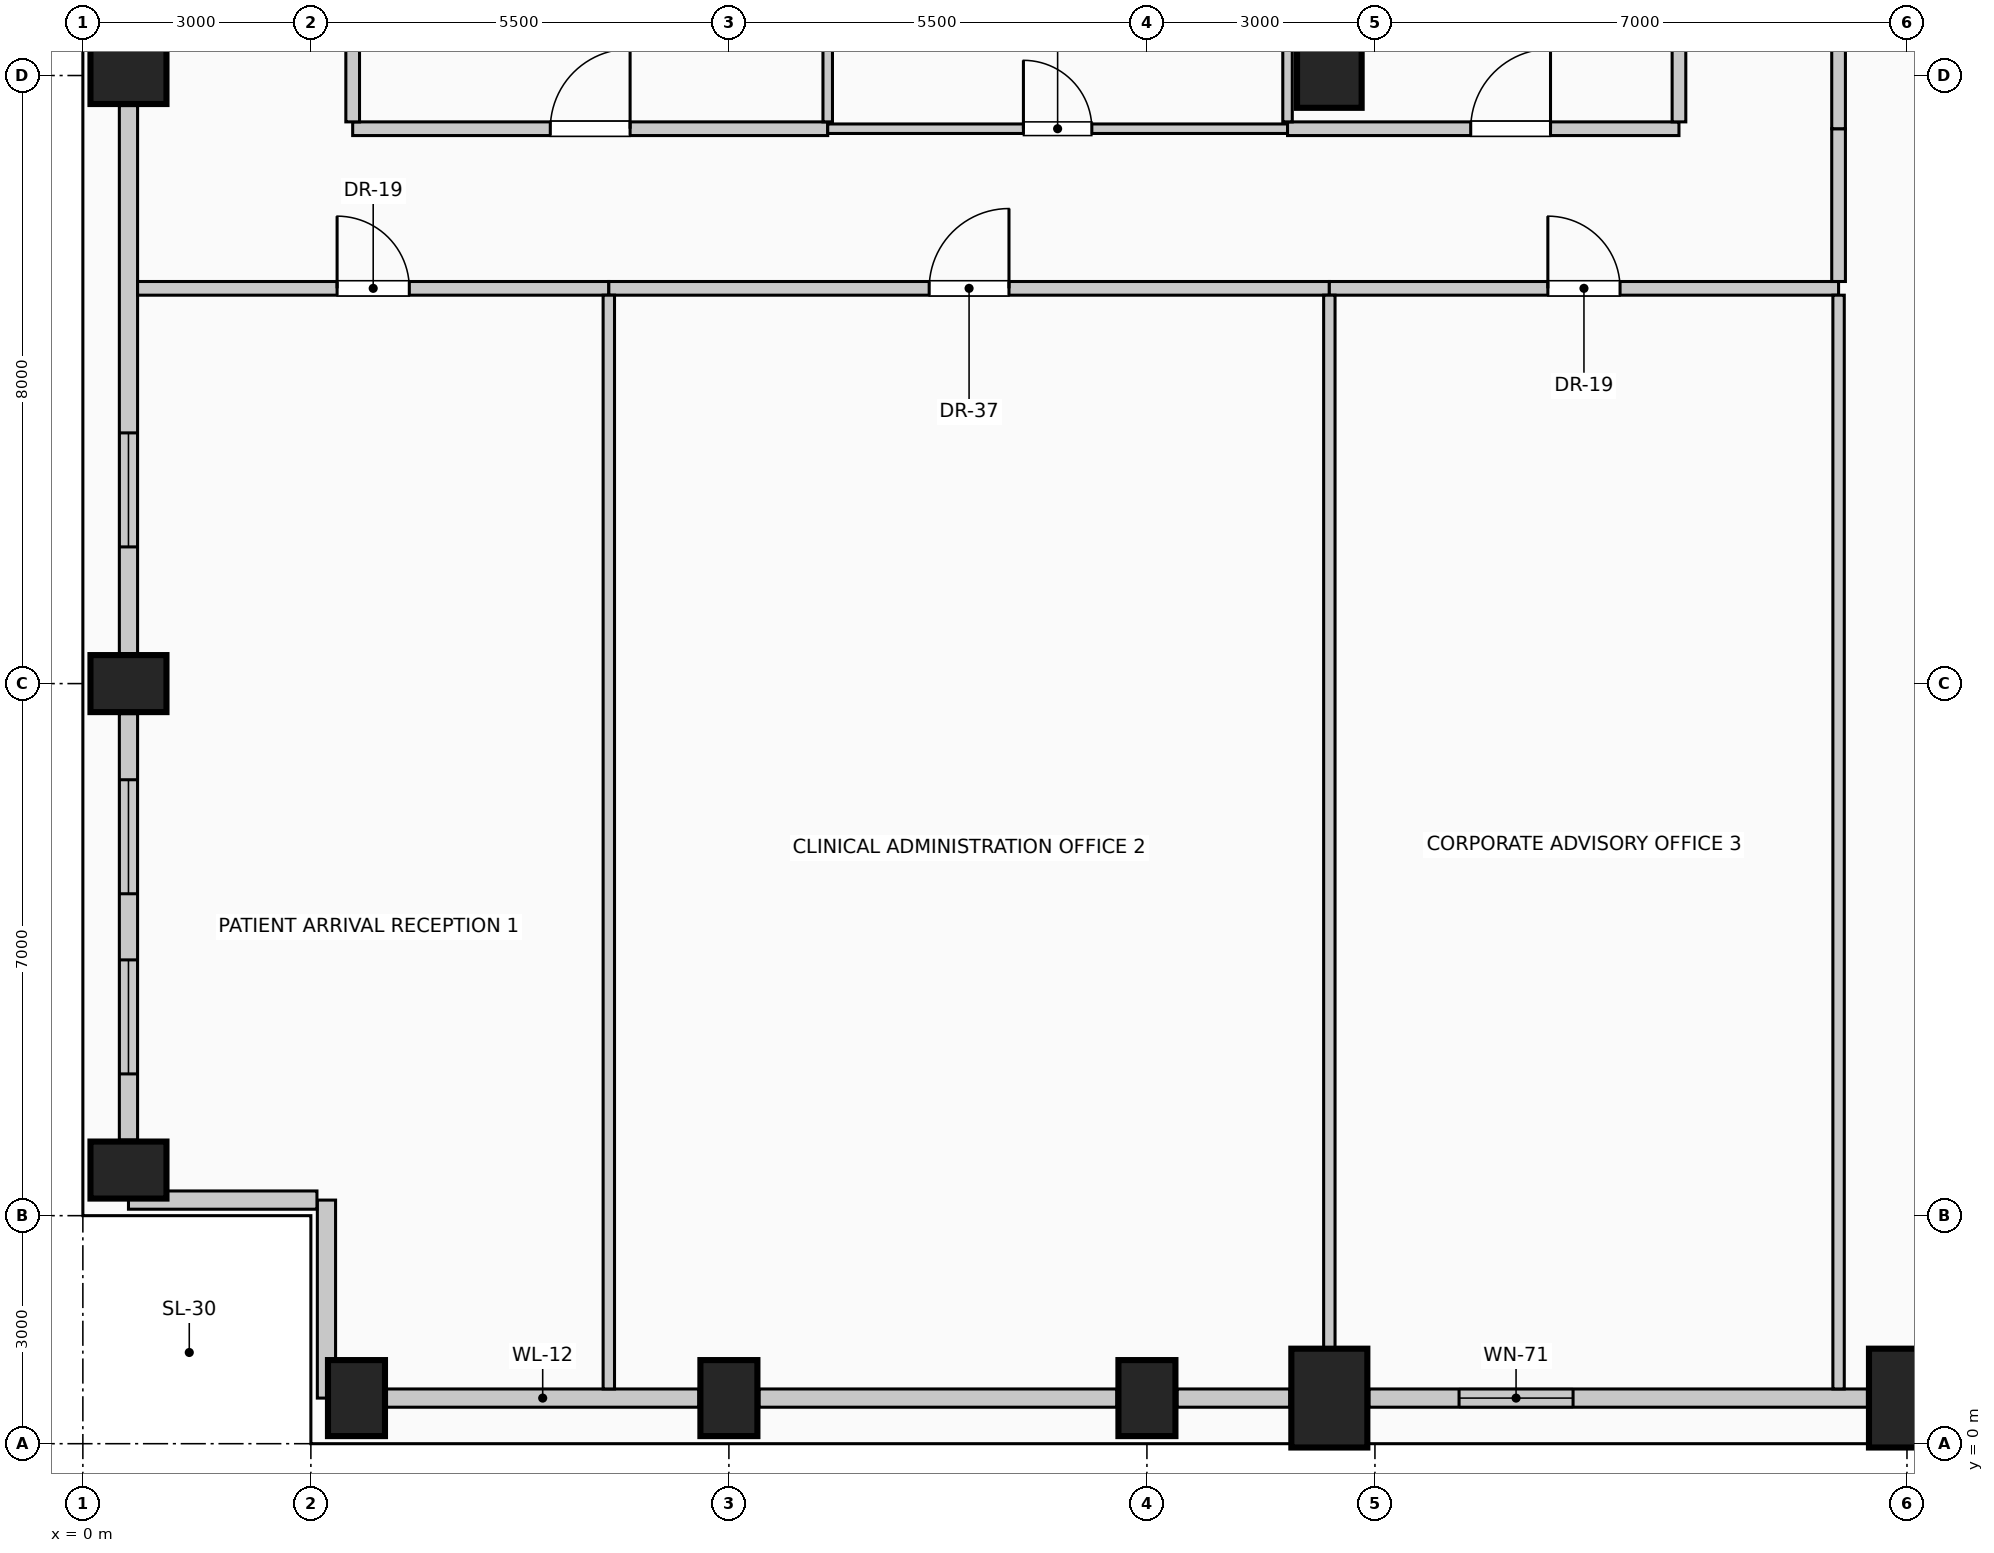
"""IFC4 building model, lengths in metres.
Left out: names, types, materials, properties, quantities, classifications, styles, units other than length and angle.
Written with IfcOpenShell. Run it as: python <this file> out.ifc"""

import sys

from ifc_helpers import new_model, si_unit, direction, frame, frame_2d, origin, origin_2d, place, context, subcontext, project, spatial, rectangle, circle, extrude, element, fill, save


model = new_model("IFC4")
c1 = context("Model", 3, precision=1e-05, world=origin(), true_north=direction((0.0, 1.0)))
c2 = subcontext(c1, "Body", "Model", "MODEL_VIEW")
j1 = project(units=[si_unit("LENGTHUNIT", "METRE"), si_unit("PLANEANGLEUNIT", "RADIAN")], contexts=[c1])
p1 = place(None, origin())
s1 = spatial("IfcSite", under=j1, at=p1, CompositionType="ELEMENT")
p2 = place(p1, origin())
s2 = spatial("IfcBuilding", under=s1, at=p2, CompositionType="ELEMENT")
p3 = place(p2, frame((0.0, 0.0, 260.6)))
s3 = spatial("IfcBuildingStorey", under=s2, at=p3, CompositionType="ELEMENT", Elevation=260.6)
for number, where, z_axis, x_axis in (
    (1, (3.6, 0.6, 0.0), (0.0, 0.0, 1.0), (1.0, 0.0, 0.0)),
    (2, (8.5, 0.6, 0.0), (0.0, 0.0, 1.0), (1.0, 0.0, 0.0)),
    (3, (14.0, 0.6, 0.0), (0.0, 0.0, 1.0), (1.0, 0.0, 0.0)),
):
    element("IfcColumn", number, at=place(p3, frame(where, z_axis=z_axis, x_axis=x_axis)), inside=s3, PredefinedType="COLUMN", context=c2, shape_type="SweptSolid", body=[
        extrude(rectangle(XDim=0.75, YDim=1.0, at=origin_2d()), origin(), (0.0, 0.0, 1.0), 4.0),
    ])
for number, where, z_axis, x_axis in (
    (4, (16.4, 0.6, 0.0), (0.0, 0.0, 1.0), (1.0, 0.0, 0.0)),
    (5, (24.0, 0.6, 0.0), (0.0, 0.0, 1.0), (1.0, 0.0, 0.0)),
):
    element("IfcColumn", number, at=place(p3, frame(where, z_axis=z_axis, x_axis=x_axis)), inside=s3, PredefinedType="COLUMN", context=c2, shape_type="SweptSolid", body=[
        extrude(rectangle(XDim=1.0, YDim=1.3, at=origin_2d()), origin(), (0.0, 0.0, 1.0), 4.0),
    ])
for number, where, z_axis, x_axis in (
    (6, (0.6, 3.6, 0.0), (0.0, 0.0, 1.0), (0.0, 1.0, 0.0)),
    (7, (0.6, 10.0, 0.0), (0.0, 0.0, 1.0), (0.0, 1.0, 0.0)),
    (8, (0.6, 18.0, 0.0), (0.0, 0.0, 1.0), (0.0, 1.0, 0.0)),
):
    element("IfcColumn", number, at=place(p3, frame(where, z_axis=z_axis, x_axis=x_axis)), inside=s3, PredefinedType="COLUMN", context=c2, shape_type="SweptSolid", body=[
        extrude(rectangle(XDim=0.75, YDim=1.0, at=origin_2d()), origin(), (0.0, 0.0, 1.0), 4.0),
    ])
p4 = place(p3, frame((16.4, 18.0, 0.0), z_axis=(0.0, 0.0, 1.0), x_axis=(1.0, 0.0, 0.0)))
e9 = element("IfcColumn", 9, at=p4, inside=s3, PredefinedType="COLUMN", context=c2, shape_type="SweptSolid", body=[
    extrude(circle(Radius=0.425, at=origin_2d()), origin(), (0.0, 0.0, 1.0), 4.0),
])
p5 = place(p3, frame((8.105, 0.6, 0.0), z_axis=(0.0, 0.0, 1.0), x_axis=(-1.0, 0.0, 0.0)))
e10 = element("IfcWall", 10, at=p5, inside=s3, PredefinedType="SOLIDWALL", context=c2, shape_type="SweptSolid", body=[
    extrude(rectangle(XDim=4.11, YDim=0.24, at=frame_2d((2.055, 0.0))), origin(), (0.0, 0.0, 1.0), 3.0),
])
p6 = place(p3, frame((13.605, 0.6, 0.0), z_axis=(0.0, 0.0, 1.0), x_axis=(-1.0, 0.0, 0.0)))
e11 = element("IfcWall", 11, at=p6, inside=s3, PredefinedType="SOLIDWALL", context=c2, shape_type="SweptSolid", body=[
    extrude(rectangle(XDim=4.71, YDim=0.24, at=frame_2d((2.355, 0.0))), origin(), (0.0, 0.0, 1.0), 3.0),
])
p7 = place(p3, frame((15.88, 0.6, 0.0), z_axis=(0.0, 0.0, 1.0), x_axis=(-1.0, 0.0, 0.0)))
e12 = element("IfcWall", 12, at=p7, inside=s3, PredefinedType="SOLIDWALL", context=c2, shape_type="SweptSolid", body=[
    extrude(rectangle(XDim=1.485, YDim=0.24, at=frame_2d((0.742, 0.0))), origin(), (0.0, 0.0, 1.0), 3.0),
])
p8 = place(p3, frame((23.48, 0.6, 0.0), z_axis=(0.0, 0.0, 1.0), x_axis=(-1.0, 0.0, 0.0)))
e13 = element("IfcWall", 13, at=p8, inside=s3, PredefinedType="SOLIDWALL", context=c2, shape_type="SweptSolid", body=[
    extrude(rectangle(XDim=6.56, YDim=0.24, at=frame_2d((3.28, 0.0))), origin(), (0.0, 0.0, 1.0), 3.0),
])
p9 = place(p8, frame((3.873, 0.0, 0.42)))
e14 = element("IfcOpeningElement", 14, at=p9, cuts=e13, PredefinedType="OPENING", context=c2, shape_type="SweptSolid", body=[
    extrude(rectangle(XDim=1.5, YDim=2.2, at=frame_2d((0.75, 1.1))), frame((0.0, 0.13, 0.0), z_axis=(0.0, -1.0, 0.0), x_axis=(1.0, 0.0, 0.0)), (0.0, 0.0, 1.0), 0.26),
])
p10 = place(p3, frame((0.6, 3.995, 0.0), z_axis=(0.0, 0.0, 1.0), x_axis=(0.0, 1.0, 0.0)))
e15 = element("IfcWall", 15, at=p10, inside=s3, PredefinedType="SOLIDWALL", context=c2, shape_type="SweptSolid", body=[
    extrude(rectangle(XDim=5.61, YDim=0.24, at=frame_2d((2.805, 0.0))), origin(), (0.0, 0.0, 1.0), 3.0),
])
p11 = place(p10, frame((0.87, 0.0, 0.42)))
e16 = element("IfcOpeningElement", 16, at=p11, cuts=e15, PredefinedType="OPENING", context=c2, shape_type="SweptSolid", body=[
    extrude(rectangle(XDim=1.5, YDim=2.2, at=frame_2d((0.75, 1.1))), frame((0.0, 0.13, 0.0), z_axis=(0.0, -1.0, 0.0), x_axis=(1.0, 0.0, 0.0)), (0.0, 0.0, 1.0), 0.26),
])
p12 = place(p10, frame((3.24, 0.0, 0.42)))
e17 = element("IfcOpeningElement", 17, at=p12, cuts=e15, PredefinedType="OPENING", context=c2, shape_type="SweptSolid", body=[
    extrude(rectangle(XDim=1.5, YDim=2.2, at=frame_2d((0.75, 1.1))), frame((0.0, 0.13, 0.0), z_axis=(0.0, -1.0, 0.0), x_axis=(1.0, 0.0, 0.0)), (0.0, 0.0, 1.0), 0.26),
])
p13 = place(p3, frame((0.6, 10.395, 0.0), z_axis=(0.0, 0.0, 1.0), x_axis=(0.0, 1.0, 0.0)))
e18 = element("IfcWall", 18, at=p13, inside=s3, PredefinedType="SOLIDWALL", context=c2, shape_type="SweptSolid", body=[
    extrude(rectangle(XDim=7.21, YDim=0.24, at=frame_2d((3.605, 0.0))), origin(), (0.0, 0.0, 1.0), 3.0),
])
p14 = place(p13, frame((1.403, 0.0, 0.42)))
e19 = element("IfcOpeningElement", 19, at=p14, cuts=e18, PredefinedType="OPENING", context=c2, shape_type="SweptSolid", body=[
    extrude(rectangle(XDim=1.5, YDim=2.2, at=frame_2d((0.75, 1.1))), frame((0.0, 0.13, 0.0), z_axis=(0.0, -1.0, 0.0), x_axis=(1.0, 0.0, 0.0)), (0.0, 0.0, 1.0), 0.26),
])
p15 = place(p3, frame((3.205, 0.6, 0.0), z_axis=(0.0, 0.0, 1.0), x_axis=(0.0, 1.0, 0.0)))
e20 = element("IfcWall", 20, at=p15, inside=s3, PredefinedType="SOLIDWALL", context=c2, shape_type="SweptSolid", body=[
    extrude(rectangle(XDim=2.605, YDim=0.24, at=frame_2d((1.302, 0.0))), origin(), (0.0, 0.0, 1.0), 3.75),
])
p16 = place(p3, frame((3.08, 3.205, 0.0), z_axis=(0.0, 0.0, 1.0), x_axis=(-1.0, 0.0, 0.0)))
e21 = element("IfcWall", 21, at=p16, inside=s3, PredefinedType="SOLIDWALL", context=c2, shape_type="SweptSolid", body=[
    extrude(rectangle(XDim=2.48, YDim=0.24, at=frame_2d((1.24, 0.0))), origin(), (0.0, 0.0, 1.0), 3.75),
])
p17 = place(p3, frame((0.72, 15.2, 0.0), z_axis=(0.0, 0.0, 1.0), x_axis=(1.0, 0.0, 0.0)))
e22 = element("IfcWall", 22, at=p17, inside=s3, PredefinedType="PARTITIONING", context=c2, shape_type="SweptSolid", body=[
    extrude(rectangle(XDim=6.2, YDim=0.18, at=frame_2d((3.1, 0.0))), origin(), (0.0, 0.0, 1.0), 3.75),
])
p18 = place(p17, frame((2.625, 0.0, 0.0)))
e23 = element("IfcOpeningElement", 23, at=p18, cuts=e22, PredefinedType="OPENING", context=c2, shape_type="SweptSolid", body=[
    extrude(rectangle(XDim=0.95, YDim=2.15, at=frame_2d((0.475, 1.075))), frame((0.0, 0.1, 0.0), z_axis=(0.0, -1.0, 0.0), x_axis=(1.0, 0.0, 0.0)), (0.0, 0.0, 1.0), 0.2),
])
p19 = place(p3, frame((6.92, 15.2, 0.0), z_axis=(0.0, 0.0, 1.0), x_axis=(1.0, 0.0, 0.0)))
e24 = element("IfcWall", 24, at=p19, inside=s3, PredefinedType="PARTITIONING", context=c2, shape_type="SweptSolid", body=[
    extrude(rectangle(XDim=9.48, YDim=0.18, at=frame_2d((4.74, 0.0))), origin(), (0.0, 0.0, 1.0), 3.75),
])
p20 = place(p19, frame((4.215, 0.0, 0.0)))
e25 = element("IfcOpeningElement", 25, at=p20, cuts=e24, PredefinedType="OPENING", context=c2, shape_type="SweptSolid", body=[
    extrude(rectangle(XDim=1.05, YDim=2.15, at=frame_2d((0.525, 1.075))), frame((0.0, 0.1, 0.0), z_axis=(0.0, -1.0, 0.0), x_axis=(1.0, 0.0, 0.0)), (0.0, 0.0, 1.0), 0.2),
])
p21 = place(p3, frame((16.4, 15.2, 0.0), z_axis=(0.0, 0.0, 1.0), x_axis=(1.0, 0.0, 0.0)))
e26 = element("IfcWall", 26, at=p21, inside=s3, PredefinedType="PARTITIONING", context=c2, shape_type="SweptSolid", body=[
    extrude(rectangle(XDim=6.7, YDim=0.18, at=frame_2d((3.35, 0.0))), origin(), (0.0, 0.0, 1.0), 3.75),
])
p22 = place(p21, frame((2.875, 0.0, 0.0)))
e27 = element("IfcOpeningElement", 27, at=p22, cuts=e26, PredefinedType="OPENING", context=c2, shape_type="SweptSolid", body=[
    extrude(rectangle(XDim=0.95, YDim=2.15, at=frame_2d((0.475, 1.075))), frame((0.0, 0.1, 0.0), z_axis=(0.0, -1.0, 0.0), x_axis=(1.0, 0.0, 0.0)), (0.0, 0.0, 1.0), 0.2),
])
p23 = place(p3, frame((3.55, 17.3, 0.0), z_axis=(0.0, 0.0, 1.0), x_axis=(1.0, 0.0, 0.0)))
e28 = element("IfcWall", 28, at=p23, inside=s3, PredefinedType="PARTITIONING", context=c2, shape_type="SweptSolid", body=[
    extrude(rectangle(XDim=6.25, YDim=0.18, at=frame_2d((3.125, 0.0))), origin(), (0.0, 0.0, 1.0), 3.75),
])
p24 = place(p23, frame((2.6, 0.0, 0.0)))
e29 = element("IfcOpeningElement", 29, at=p24, cuts=e28, PredefinedType="OPENING", context=c2, shape_type="SweptSolid", body=[
    extrude(rectangle(XDim=1.05, YDim=2.15, at=frame_2d((0.525, 1.075))), frame((0.0, 0.1, 0.0), z_axis=(0.0, -1.0, 0.0), x_axis=(1.0, 0.0, 0.0)), (0.0, 0.0, 1.0), 0.2),
])
p25 = place(p3, frame((9.8, 17.3, 0.0), z_axis=(0.0, 0.0, 1.0), x_axis=(1.0, 0.0, 0.0)))
e30 = element("IfcWall", 30, at=p25, inside=s3, PredefinedType="PARTITIONING", context=c2, shape_type="SweptSolid", body=[
    extrude(rectangle(XDim=6.05, YDim=0.125, at=frame_2d((3.025, 0.0))), origin(), (0.0, 0.0, 1.0), 3.75),
])
p26 = place(p25, frame((2.575, 0.0, 0.0)))
e31 = element("IfcOpeningElement", 31, at=p26, cuts=e30, PredefinedType="OPENING", context=c2, shape_type="SweptSolid", body=[
    extrude(rectangle(XDim=0.9, YDim=2.1, at=frame_2d((0.45, 1.05))), frame((0.0, 0.073, 0.0), z_axis=(0.0, -1.0, 0.0), x_axis=(1.0, 0.0, 0.0)), (0.0, 0.0, 1.0), 0.145),
])
p27 = place(p3, frame((15.85, 17.3, 0.0), z_axis=(0.0, 0.0, 1.0), x_axis=(1.0, 0.0, 0.0)))
e32 = element("IfcWall", 32, at=p27, inside=s3, PredefinedType="PARTITIONING", context=c2, shape_type="SweptSolid", body=[
    extrude(rectangle(XDim=5.15, YDim=0.18, at=frame_2d((2.575, 0.0))), origin(), (0.0, 0.0, 1.0), 3.75),
])
p28 = place(p27, frame((2.41, 0.0, 0.0)))
e33 = element("IfcOpeningElement", 33, at=p28, cuts=e32, PredefinedType="OPENING", context=c2, shape_type="SweptSolid", body=[
    extrude(rectangle(XDim=1.05, YDim=2.15, at=frame_2d((0.525, 1.075))), frame((0.0, 0.1, 0.0), z_axis=(0.0, -1.0, 0.0), x_axis=(1.0, 0.0, 0.0)), (0.0, 0.0, 1.0), 0.2),
])
p29 = place(p3, frame((3.55, 17.39, 0.0), z_axis=(0.0, 0.0, 1.0), x_axis=(0.0, 1.0, 0.0)))
e34 = element("IfcWall", 34, at=p29, inside=s3, PredefinedType="PARTITIONING", context=c2, shape_type="SweptSolid", body=[
    extrude(rectangle(XDim=7.335, YDim=0.18, at=frame_2d((3.667, 0.0))), origin(), (0.0, 0.0, 1.0), 3.75),
])
p30 = place(p3, frame((6.92, 0.72, 0.0), z_axis=(0.0, 0.0, 1.0), x_axis=(0.0, 1.0, 0.0)))
e35 = element("IfcWall", 35, at=p30, inside=s3, PredefinedType="PARTITIONING", context=c2, shape_type="SweptSolid", body=[
    extrude(rectangle(XDim=14.39, YDim=0.15, at=frame_2d((7.195, 0.0))), origin(), (0.0, 0.0, 1.0), 3.75),
])
for number, where, z_axis, x_axis in (
    (36, (9.8, 17.39, 0.0), (0.0, 0.0, 1.0), (0.0, 1.0, 0.0)),
    (37, (15.85, 17.39, 0.0), (0.0, 0.0, 1.0), (0.0, 1.0, 0.0)),
):
    element("IfcWall", number, at=place(p3, frame(where, z_axis=z_axis, x_axis=x_axis)), inside=s3, PredefinedType="PARTITIONING", context=c2, shape_type="SweptSolid", body=[
        extrude(rectangle(XDim=7.335, YDim=0.125, at=frame_2d((3.667, 0.0))), origin(), (0.0, 0.0, 1.0), 3.75),
    ])
p31 = place(p3, frame((16.4, 1.25, 0.0), z_axis=(0.0, 0.0, 1.0), x_axis=(0.0, 1.0, 0.0)))
e38 = element("IfcWall", 38, at=p31, inside=s3, PredefinedType="PARTITIONING", context=c2, shape_type="SweptSolid", body=[
    extrude(rectangle(XDim=13.86, YDim=0.15, at=frame_2d((6.93, 0.0))), origin(), (0.0, 0.0, 1.0), 3.195),
])
p32 = place(p3, frame((21.0, 17.39, 0.0), z_axis=(0.0, 0.0, 1.0), x_axis=(0.0, 1.0, 0.0)))
e39 = element("IfcWall", 39, at=p32, inside=s3, PredefinedType="PARTITIONING", context=c2, shape_type="SweptSolid", body=[
    extrude(rectangle(XDim=7.335, YDim=0.18, at=frame_2d((3.667, 0.0))), origin(), (0.0, 0.0, 1.0), 3.75),
])
p33 = place(p3, frame((23.1, 0.72, 0.0), z_axis=(0.0, 0.0, 1.0), x_axis=(0.0, 1.0, 0.0)))
e40 = element("IfcWall", 40, at=p33, inside=s3, PredefinedType="PARTITIONING", context=c2, shape_type="SweptSolid", body=[
    extrude(rectangle(XDim=14.39, YDim=0.15, at=frame_2d((7.195, 0.0))), origin(), (0.0, 0.0, 1.0), 3.75),
])
p34 = place(p3, frame((23.1, 15.29, 0.0), z_axis=(0.0, 0.0, 1.0), x_axis=(0.0, 1.0, 0.0)))
e41 = element("IfcWall", 41, at=p34, inside=s3, PredefinedType="PARTITIONING", context=c2, shape_type="SweptSolid", body=[
    extrude(rectangle(XDim=2.01, YDim=0.18, at=frame_2d((1.005, 0.0))), origin(), (0.0, 0.0, 1.0), 3.75),
])
p35 = place(p3, frame((23.1, 17.3, 0.0), z_axis=(0.0, 0.0, 1.0), x_axis=(0.0, 1.0, 0.0)))
e42 = element("IfcWall", 42, at=p35, inside=s3, PredefinedType="PARTITIONING", context=c2, shape_type="SweptSolid", body=[
    extrude(rectangle(XDim=9.51, YDim=0.18, at=frame_2d((4.755, 0.0))), origin(), (0.0, 0.0, 1.0), 3.75),
])
p36 = place(p9, origin())
e43 = element("IfcWindow", 43, at=p36, inside=s3, PartitioningType="SINGLE_PANEL", PredefinedType="WINDOW", context=c2, shape_type="SweptSolid", body=[
    extrude(rectangle(XDim=1.5, YDim=2.2, at=frame_2d((0.75, 1.1))), frame((0.0, 0.03, 0.0), z_axis=(0.0, -1.0, 0.0), x_axis=(1.0, 0.0, 0.0)), (0.0, 0.0, 1.0), 0.06),
])
fill(e14, e43)
p37 = place(p11, origin())
e44 = element("IfcWindow", 44, at=p37, inside=s3, PartitioningType="SINGLE_PANEL", PredefinedType="WINDOW", context=c2, shape_type="SweptSolid", body=[
    extrude(rectangle(XDim=1.5, YDim=2.2, at=frame_2d((0.75, 1.1))), frame((0.0, 0.03, 0.0), z_axis=(0.0, -1.0, 0.0), x_axis=(1.0, 0.0, 0.0)), (0.0, 0.0, 1.0), 0.06),
])
fill(e16, e44)
p38 = place(p12, origin())
e45 = element("IfcWindow", 45, at=p38, inside=s3, PartitioningType="SINGLE_PANEL", PredefinedType="WINDOW", context=c2, shape_type="SweptSolid", body=[
    extrude(rectangle(XDim=1.5, YDim=2.2, at=frame_2d((0.75, 1.1))), frame((0.0, 0.03, 0.0), z_axis=(0.0, -1.0, 0.0), x_axis=(1.0, 0.0, 0.0)), (0.0, 0.0, 1.0), 0.06),
])
fill(e17, e45)
p39 = place(p14, origin())
e46 = element("IfcWindow", 46, at=p39, inside=s3, PartitioningType="SINGLE_PANEL", PredefinedType="WINDOW", context=c2, shape_type="SweptSolid", body=[
    extrude(rectangle(XDim=1.5, YDim=2.2, at=frame_2d((0.75, 1.1))), frame((0.0, 0.03, 0.0), z_axis=(0.0, -1.0, 0.0), x_axis=(1.0, 0.0, 0.0)), (0.0, 0.0, 1.0), 0.06),
])
fill(e19, e46)
p40 = place(p18, origin())
e47 = element("IfcDoor", 47, at=p40, inside=s3, OperationType="SINGLE_SWING_LEFT", PredefinedType="DOOR", context=c2, shape_type="SweptSolid", body=[
    extrude(rectangle(XDim=0.95, YDim=2.15, at=frame_2d((0.475, 1.075))), frame((0.0, 0.025, 0.0), z_axis=(0.0, -1.0, 0.0), x_axis=(1.0, 0.0, 0.0)), (0.0, 0.0, 1.0), 0.05),
])
fill(e23, e47)
p41 = place(p20, origin())
e48 = element("IfcDoor", 48, at=p41, inside=s3, OperationType="SINGLE_SWING_RIGHT", PredefinedType="DOOR", context=c2, shape_type="SweptSolid", body=[
    extrude(rectangle(XDim=1.05, YDim=2.15, at=frame_2d((0.525, 1.075))), frame((0.0, 0.025, 0.0), z_axis=(0.0, -1.0, 0.0), x_axis=(1.0, 0.0, 0.0)), (0.0, 0.0, 1.0), 0.05),
])
fill(e25, e48)
p42 = place(p22, origin())
e49 = element("IfcDoor", 49, at=p42, inside=s3, OperationType="SINGLE_SWING_LEFT", PredefinedType="DOOR", context=c2, shape_type="SweptSolid", body=[
    extrude(rectangle(XDim=0.95, YDim=2.15, at=frame_2d((0.475, 1.075))), frame((0.0, 0.025, 0.0), z_axis=(0.0, -1.0, 0.0), x_axis=(1.0, 0.0, 0.0)), (0.0, 0.0, 1.0), 0.05),
])
fill(e27, e49)
p43 = place(p24, origin())
e50 = element("IfcDoor", 50, at=p43, inside=s3, OperationType="SINGLE_SWING_RIGHT", PredefinedType="DOOR", context=c2, shape_type="SweptSolid", body=[
    extrude(rectangle(XDim=1.05, YDim=2.15, at=frame_2d((0.525, 1.075))), frame((0.0, 0.025, 0.0), z_axis=(0.0, -1.0, 0.0), x_axis=(1.0, 0.0, 0.0)), (0.0, 0.0, 1.0), 0.05),
])
fill(e29, e50)
p44 = place(p26, origin())
e51 = element("IfcDoor", 51, at=p44, inside=s3, OperationType="SINGLE_SWING_LEFT", PredefinedType="DOOR", context=c2, shape_type="SweptSolid", body=[
    extrude(rectangle(XDim=0.9, YDim=2.1, at=frame_2d((0.45, 1.05))), frame((0.0, 0.025, 0.0), z_axis=(0.0, -1.0, 0.0), x_axis=(1.0, 0.0, 0.0)), (0.0, 0.0, 1.0), 0.05),
])
fill(e31, e51)
p45 = place(p28, origin())
e52 = element("IfcDoor", 52, at=p45, inside=s3, OperationType="SINGLE_SWING_RIGHT", PredefinedType="DOOR", context=c2, shape_type="SweptSolid", body=[
    extrude(rectangle(XDim=1.05, YDim=2.15, at=frame_2d((0.525, 1.075))), frame((0.0, 0.025, 0.0), z_axis=(0.0, -1.0, 0.0), x_axis=(1.0, 0.0, 0.0)), (0.0, 0.0, 1.0), 0.05),
])
fill(e33, e52)
save(model, sys.argv[1])
